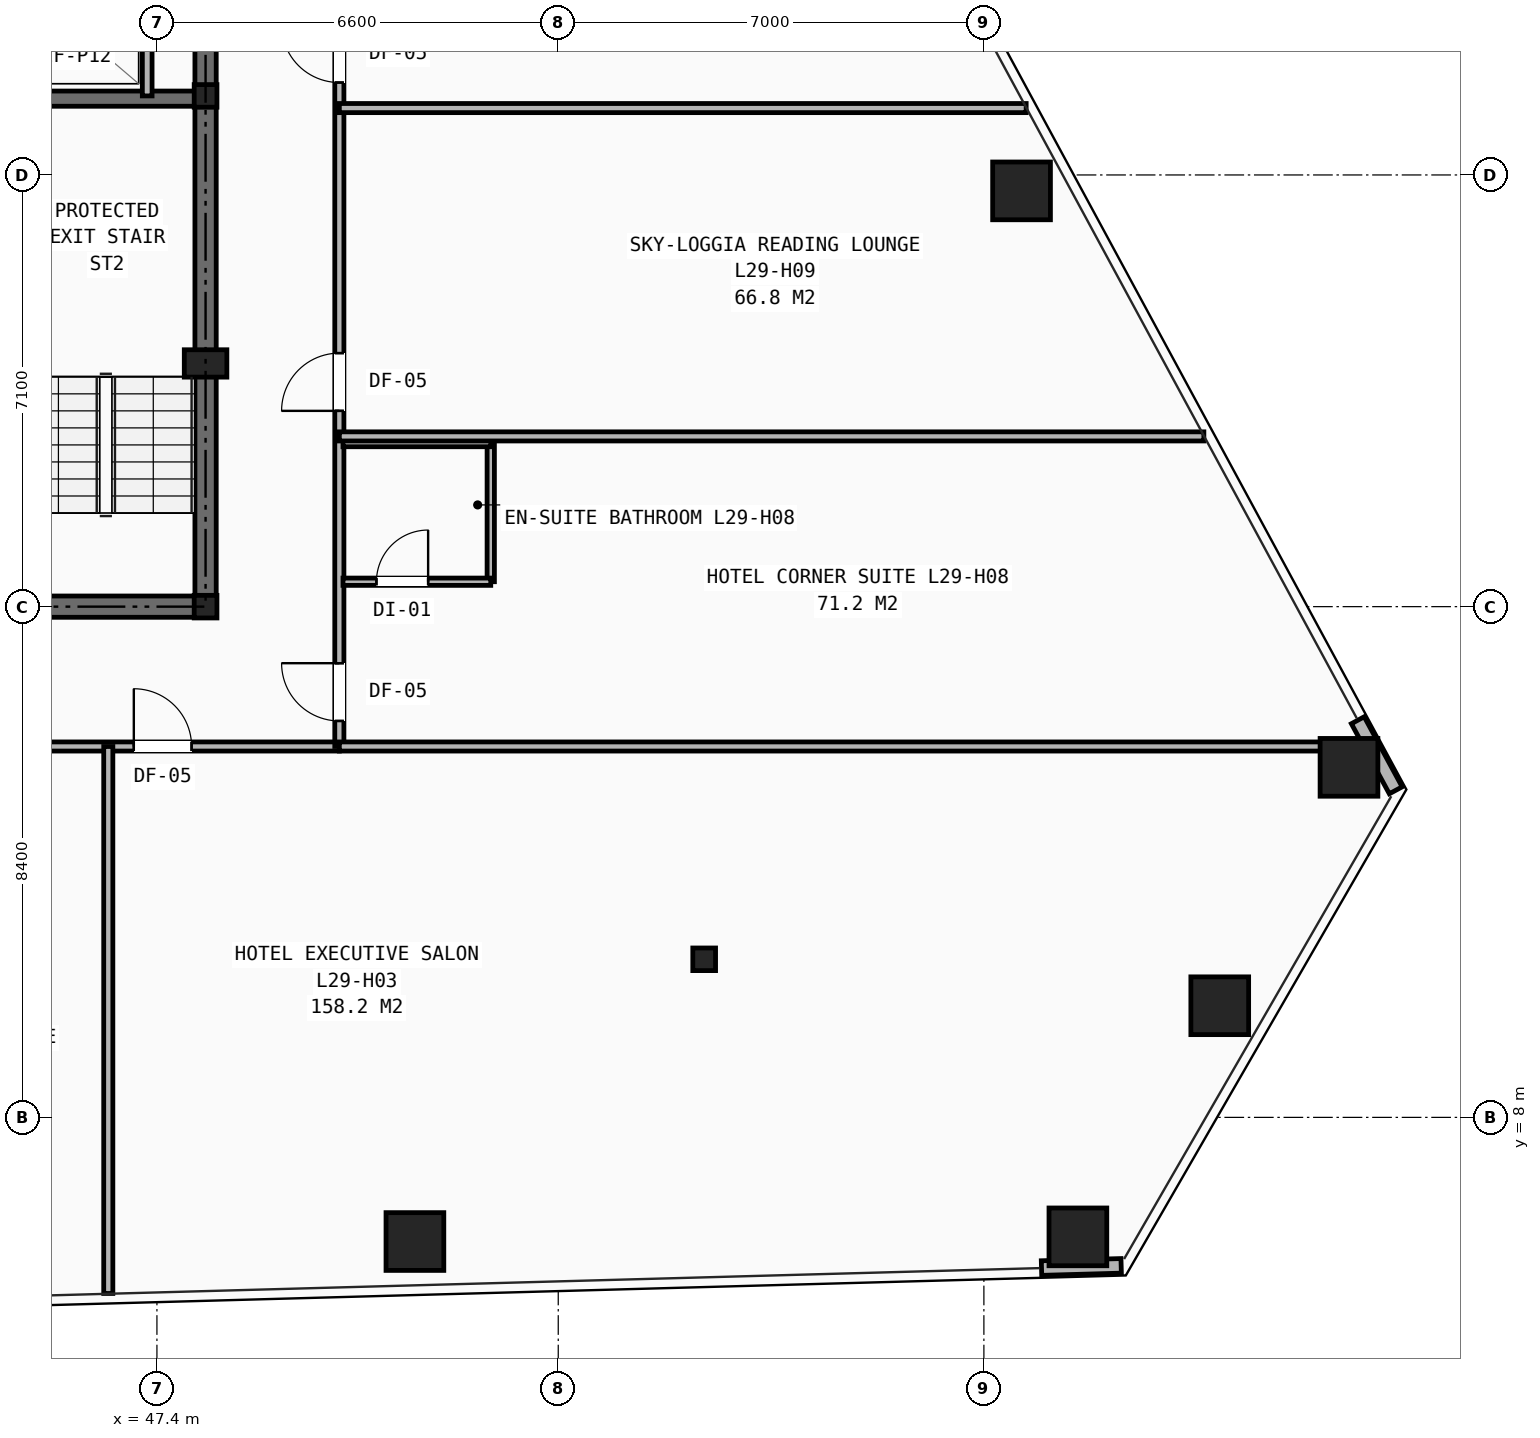
"""IFC4 building model, lengths in metres.
Left out: names, types, materials, properties, quantities, classifications, styles, units other than length and angle.
Written with IfcOpenShell. Run it as: python <this file> out.ifc"""

import sys

from ifc_helpers import new_model, si_unit, direction, frame, frame_2d, origin, origin_2d, place, context, subcontext, project, spatial, rectangle, hollow_rectangle, i_section, extrude, element, fill, save


model = new_model("IFC4")
c1 = context("Model", 3, precision=1e-05, world=origin(), true_north=direction((0.0, 1.0)))
c2 = subcontext(c1, "Body", "Model", "MODEL_VIEW")
j1 = project(units=[si_unit("LENGTHUNIT", "METRE"), si_unit("PLANEANGLEUNIT", "RADIAN")], contexts=[c1])
p1 = place(None, origin())
s1 = spatial("IfcSite", under=j1, at=p1, CompositionType="ELEMENT")
p2 = place(p1, origin())
s2 = spatial("IfcBuilding", under=s1, at=p2, CompositionType="ELEMENT")
p3 = place(p2, frame((0.0, 0.0, 102.2)))
s3 = spatial("IfcBuildingStorey", under=s2, at=p3, CompositionType="ELEMENT", Elevation=102.2)
for number, where, z_axis, x_axis in (
    (1, (48.2, 16.4, 0.0), (0.0, 0.0, 1.0), (1.0, 0.0, 0.0)),
    (2, (48.2, 24.8, 0.0), (0.0, 0.0, 1.0), (1.0, 0.0, 0.0)),
    (3, (56.4, 10.6, 0.0), (0.0, 0.0, 1.0), (1.0, 0.0, 0.0)),
):
    element("IfcColumn", number, at=place(p3, frame(where, z_axis=z_axis, x_axis=x_axis)), inside=s3, PredefinedType="COLUMN", context=c2, shape_type="SweptSolid", body=[
        extrude(i_section(OverallWidth=0.374, OverallDepth=0.372, WebThickness=0.016, FlangeThickness=0.026, at=origin_2d()), origin(), (0.0, 0.0, 1.0), 3.2),
    ])
p4 = place(p3, frame((48.2, 20.4, 0.0), z_axis=(0.0, 0.0, 1.0), x_axis=(1.0, 0.0, 0.0)))
e4 = element("IfcColumn", 4, at=p4, inside=s3, PredefinedType="PILASTER", context=c2, shape_type="SweptSolid", body=[
    extrude(rectangle(XDim=0.7, YDim=0.45, at=origin_2d()), origin(), (0.0, 0.0, 1.0), 3.2),
])
for number, where, z_axis, x_axis in (
    (5, (51.643, 5.958, 0.0), (0.0, 0.0, 1.0), (1.0, 0.0, 0.0)),
    (6, (62.546, 6.035, 0.0), (0.0, 0.0, 1.0), (1.0, 0.0, 0.0)),
    (7, (64.879, 9.836, 0.0), (0.0, 0.0, 1.0), (1.0, 0.0, 0.0)),
    (8, (67.004, 13.757, 0.0), (0.0, 0.0, 1.0), (1.0, 0.0, 0.0)),
    (9, (61.619, 23.238, 0.0), (0.0, 0.0, 1.0), (1.0, 0.0, 0.0)),
):
    element("IfcColumn", number, at=place(p3, frame(where, z_axis=z_axis, x_axis=x_axis)), inside=s3, PredefinedType="COLUMN", context=c2, shape_type="SweptSolid", body=[
        extrude(hollow_rectangle(XDim=0.95, YDim=0.95, WallThickness=0.065, at=origin_2d()), origin(), (0.0, 0.0, 1.0), 3.2),
    ])
p5 = place(p3, frame((61.948, 5.522, 0.0), z_axis=(0.0, 0.0, 1.0), x_axis=(0.999614564295, 0.027761895635, 0.0)))
e10 = element("IfcWall", 10, at=p5, inside=s3, PredefinedType="SHEAR", context=c2, shape_type="SweptSolid", body=[
    extrude(rectangle(XDim=1.31, YDim=0.24, at=frame_2d((0.655, 0.0))), origin(), (0.0, 0.0, 1.0), 2.253),
])
p6 = place(p3, frame((67.773, 13.379, 0.0), z_axis=(0.0, 0.0, 1.0), x_axis=(-0.475820948293, 0.879542167929, 0.0)))
e11 = element("IfcWall", 11, at=p6, inside=s3, PredefinedType="SHEAR", context=c2, shape_type="SweptSolid", body=[
    extrude(rectangle(XDim=1.311, YDim=0.24, at=frame_2d((0.655, 0.0))), origin(), (0.0, 0.0, 1.0), 2.253),
])
p7 = place(p3, frame((31.8, 16.4, 0.0), z_axis=(0.0, 0.0, 1.0), x_axis=(1.0, 0.0, 0.0)))
e12 = element("IfcWall", 12, at=p7, inside=s3, PredefinedType="SHEAR", context=c2, shape_type="SweptSolid", body=[
    extrude(rectangle(XDim=16.4, YDim=0.35, at=frame_2d((8.2, 0.0))), origin(), (0.0, 0.0, 1.0), 2.97),
])
p8 = place(p7, frame((7.75, 0.0, 0.0)))
e13 = element("IfcOpeningElement", 13, at=p8, cuts=e12, PredefinedType="OPENING", context=c2, shape_type="SweptSolid", body=[
    extrude(rectangle(XDim=0.9, YDim=2.1, at=frame_2d((0.45, 1.05))), frame((0.0, 0.185, 0.0), z_axis=(0.0, -1.0, 0.0), x_axis=(1.0, 0.0, 0.0)), (0.0, 0.0, 1.0), 0.37),
])
p9 = place(p7, frame((4.2, 0.0, 0.0)))
e14 = element("IfcOpeningElement", 14, at=p9, cuts=e12, PredefinedType="OPENING", context=c2, shape_type="SweptSolid", body=[
    extrude(rectangle(XDim=0.95, YDim=2.1, at=frame_2d((0.475, 1.05))), frame((0.0, 0.185, 0.0), z_axis=(0.0, -1.0, 0.0), x_axis=(1.0, 0.0, 0.0)), (0.0, 0.0, 1.0), 0.37),
])
p10 = place(p7, frame((10.6, 0.0, 0.0)))
e15 = element("IfcOpeningElement", 15, at=p10, cuts=e12, PredefinedType="OPENING", context=c2, shape_type="SweptSolid", body=[
    extrude(rectangle(XDim=0.95, YDim=2.1, at=frame_2d((0.475, 1.05))), frame((0.0, 0.185, 0.0), z_axis=(0.0, -1.0, 0.0), x_axis=(1.0, 0.0, 0.0)), (0.0, 0.0, 1.0), 0.37),
])
p11 = place(p3, frame((48.2, 16.4, 0.0), z_axis=(0.0, 0.0, 1.0), x_axis=(0.0, 1.0, 0.0)))
e16 = element("IfcWall", 16, at=p11, inside=s3, PredefinedType="SHEAR", context=c2, shape_type="SweptSolid", body=[
    extrude(rectangle(XDim=14.8, YDim=0.35, at=frame_2d((7.4, 0.0))), origin(), (0.0, 0.0, 1.0), 2.97),
])
p12 = place(p11, frame((11.0, 0.0, 0.0)))
e17 = element("IfcOpeningElement", 17, at=p12, cuts=e16, PredefinedType="OPENING", context=c2, shape_type="SweptSolid", body=[
    extrude(rectangle(XDim=1.1, YDim=2.15, at=frame_2d((0.55, 1.075))), frame((0.0, 0.185, 0.0), z_axis=(0.0, -1.0, 0.0), x_axis=(1.0, 0.0, 0.0)), (0.0, 0.0, 1.0), 0.37),
])
p13 = place(p3, frame((44.955, 24.755, 0.0), z_axis=(0.0, 0.0, 1.0), x_axis=(1.0, 0.0, 0.0)))
e18 = element("IfcWall", 18, at=p13, inside=s3, PredefinedType="SHEAR", context=c2, shape_type="SweptSolid", body=[
    extrude(rectangle(XDim=3.245, YDim=0.25, at=frame_2d((1.623, 0.0))), origin(), (0.0, 0.0, 1.0), 2.97),
])
p14 = place(p3, frame((47.24, 24.8, 0.0), z_axis=(0.0, 0.0, 1.0), x_axis=(0.0, 1.0, 0.0)))
e19 = element("IfcWall", 19, at=p14, inside=s3, PredefinedType="SOLIDWALL", context=c2, shape_type="SweptSolid", body=[
    extrude(rectangle(XDim=2.08, YDim=0.16, at=frame_2d((1.04, 0.0))), origin(), (0.0, 0.0, 1.0), 2.97),
])
p15 = place(p3, frame((29.6, 14.1, 0.0), z_axis=(0.0, 0.0, 1.0), x_axis=(1.0, 0.0, 0.0)))
e20 = element("IfcWall", 20, at=p15, inside=s3, PredefinedType="PARTITIONING", context=c2, shape_type="SweptSolid", body=[
    extrude(rectangle(XDim=20.8, YDim=0.15, at=frame_2d((10.4, 0.0))), origin(), (0.0, 0.0, 1.0), 2.421),
])
p16 = place(p15, frame((0.57, 0.0, 0.0)))
e21 = element("IfcOpeningElement", 21, at=p16, cuts=e20, PredefinedType="OPENING", context=c2, shape_type="SweptSolid", body=[
    extrude(rectangle(XDim=0.95, YDim=2.1, at=frame_2d((0.475, 1.05))), frame((0.0, 0.085, 0.0), z_axis=(0.0, -1.0, 0.0), x_axis=(1.0, 0.0, 0.0)), (0.0, 0.0, 1.0), 0.17),
])
p17 = place(p15, frame((13.02, 0.0, 0.0)))
e22 = element("IfcOpeningElement", 22, at=p17, cuts=e20, PredefinedType="OPENING", context=c2, shape_type="SweptSolid", body=[
    extrude(rectangle(XDim=0.95, YDim=2.1, at=frame_2d((0.475, 1.05))), frame((0.0, 0.085, 0.0), z_axis=(0.0, -1.0, 0.0), x_axis=(1.0, 0.0, 0.0)), (0.0, 0.0, 1.0), 0.17),
])
p18 = place(p15, frame((17.42, 0.0, 0.0)))
e23 = element("IfcOpeningElement", 23, at=p18, cuts=e20, PredefinedType="OPENING", context=c2, shape_type="SweptSolid", body=[
    extrude(rectangle(XDim=0.95, YDim=2.1, at=frame_2d((0.475, 1.05))), frame((0.0, 0.085, 0.0), z_axis=(0.0, -1.0, 0.0), x_axis=(1.0, 0.0, 0.0)), (0.0, 0.0, 1.0), 0.17),
])
p19 = place(p3, frame((50.4, 14.1, 0.0), z_axis=(0.0, 0.0, 1.0), x_axis=(0.0, 1.0, 0.0)))
e24 = element("IfcWall", 24, at=p19, inside=s3, PredefinedType="PARTITIONING", context=c2, shape_type="SweptSolid", body=[
    extrude(rectangle(XDim=21.9, YDim=0.15, at=frame_2d((10.95, 0.0))), origin(), (0.0, 0.0, 1.0), 2.421),
])
p20 = place(p19, frame((0.42, 0.0, 0.0)))
e25 = element("IfcOpeningElement", 25, at=p20, cuts=e24, PredefinedType="OPENING", context=c2, shape_type="SweptSolid", body=[
    extrude(rectangle(XDim=0.95, YDim=2.1, at=frame_2d((0.475, 1.05))), frame((0.0, 0.085, 0.0), z_axis=(0.0, -1.0, 0.0), x_axis=(1.0, 0.0, 0.0)), (0.0, 0.0, 1.0), 0.17),
])
p21 = place(p19, frame((5.52, 0.0, 0.0)))
e26 = element("IfcOpeningElement", 26, at=p21, cuts=e24, PredefinedType="OPENING", context=c2, shape_type="SweptSolid", body=[
    extrude(rectangle(XDim=0.95, YDim=2.1, at=frame_2d((0.475, 1.05))), frame((0.0, 0.085, 0.0), z_axis=(0.0, -1.0, 0.0), x_axis=(1.0, 0.0, 0.0)), (0.0, 0.0, 1.0), 0.17),
])
p22 = place(p19, frame((10.92, 0.0, 0.0)))
e27 = element("IfcOpeningElement", 27, at=p22, cuts=e24, PredefinedType="OPENING", context=c2, shape_type="SweptSolid", body=[
    extrude(rectangle(XDim=0.95, YDim=2.1, at=frame_2d((0.475, 1.05))), frame((0.0, 0.085, 0.0), z_axis=(0.0, -1.0, 0.0), x_axis=(1.0, 0.0, 0.0)), (0.0, 0.0, 1.0), 0.17),
])
p23 = place(p19, frame((16.72, 0.0, 0.0)))
e28 = element("IfcOpeningElement", 28, at=p23, cuts=e24, PredefinedType="OPENING", context=c2, shape_type="SweptSolid", body=[
    extrude(rectangle(XDim=0.95, YDim=2.1, at=frame_2d((0.475, 1.05))), frame((0.0, 0.085, 0.0), z_axis=(0.0, -1.0, 0.0), x_axis=(1.0, 0.0, 0.0)), (0.0, 0.0, 1.0), 0.17),
])
p24 = place(p3, frame((46.6, 5.104, 0.0), z_axis=(0.0, 0.0, 1.0), x_axis=(0.0, 1.0, 0.0)))
e29 = element("IfcWall", 29, at=p24, inside=s3, PredefinedType="PARTITIONING", context=c2, shape_type="SweptSolid", body=[
    extrude(rectangle(XDim=8.996, YDim=0.15, at=frame_2d((4.498, 0.0))), origin(), (0.0, 0.0, 1.0), 2.258),
])
p25 = place(p3, frame((50.4, 14.1, 0.0), z_axis=(0.0, 0.0, 1.0), x_axis=(1.0, 0.0, 0.0)))
e30 = element("IfcWall", 30, at=p25, inside=s3, PredefinedType="PARTITIONING", context=c2, shape_type="SweptSolid", body=[
    extrude(rectangle(XDim=16.978, YDim=0.15, at=frame_2d((8.489, 0.0))), origin(), (0.0, 0.0, 1.0), 2.258),
])
p26 = place(p3, frame((52.89, 16.81, 0.0), z_axis=(0.0, 0.0, 1.0), x_axis=(0.0, 1.0, 0.0)))
e31 = element("IfcWall", 31, at=p26, inside=s3, PredefinedType="PARTITIONING", context=c2, shape_type="SweptSolid", body=[
    extrude(rectangle(XDim=2.28, YDim=0.12, at=frame_2d((1.14, 0.0))), origin(), (0.0, 0.0, 1.0), 2.97),
])
p27 = place(p3, frame((50.46, 16.81, 0.0), z_axis=(0.0, 0.0, 1.0), x_axis=(1.0, 0.0, 0.0)))
e32 = element("IfcWall", 32, at=p27, inside=s3, PredefinedType="PARTITIONING", context=c2, shape_type="SweptSolid", body=[
    extrude(rectangle(XDim=2.43, YDim=0.12, at=frame_2d((1.215, 0.0))), origin(), (0.0, 0.0, 1.0), 2.97),
])
p28 = place(p27, frame((0.55, 0.0, 0.0)))
e33 = element("IfcOpeningElement", 33, at=p28, cuts=e32, PredefinedType="OPENING", context=c2, shape_type="SweptSolid", body=[
    extrude(rectangle(XDim=0.85, YDim=2.05, at=frame_2d((0.425, 1.025))), frame((0.0, 0.07, 0.0), z_axis=(0.0, -1.0, 0.0), x_axis=(1.0, 0.0, 0.0)), (0.0, 0.0, 1.0), 0.14),
])
p29 = place(p3, frame((50.46, 19.09, 0.0), z_axis=(0.0, 0.0, 1.0), x_axis=(1.0, 0.0, 0.0)))
e34 = element("IfcWall", 34, at=p29, inside=s3, PredefinedType="PARTITIONING", context=c2, shape_type="SweptSolid", body=[
    extrude(rectangle(XDim=2.43, YDim=0.12, at=frame_2d((1.215, 0.0))), origin(), (0.0, 0.0, 1.0), 2.97),
])
p30 = place(p3, frame((50.4, 19.2, 0.0), z_axis=(0.0, 0.0, 1.0), x_axis=(1.0, 0.0, 0.0)))
e35 = element("IfcWall", 35, at=p30, inside=s3, PredefinedType="PARTITIONING", context=c2, shape_type="SweptSolid", body=[
    extrude(rectangle(XDim=14.218, YDim=0.15, at=frame_2d((7.109, 0.0))), origin(), (0.0, 0.0, 1.0), 2.258),
])
p31 = place(p3, frame((50.4, 24.6, 0.0), z_axis=(0.0, 0.0, 1.0), x_axis=(1.0, 0.0, 0.0)))
e36 = element("IfcWall", 36, at=p31, inside=s3, PredefinedType="PARTITIONING", context=c2, shape_type="SweptSolid", body=[
    extrude(rectangle(XDim=11.295, YDim=0.15, at=frame_2d((5.648, 0.0))), origin(), (0.0, 0.0, 1.0), 2.258),
])
p32 = place(p18, origin())
e37 = element("IfcDoor", 37, at=p32, inside=s3, OperationType="SINGLE_SWING_LEFT", PredefinedType="DOOR", context=c2, shape_type="SweptSolid", body=[
    extrude(rectangle(XDim=0.95, YDim=2.1, at=frame_2d((0.475, 1.05))), frame((0.0, 0.025, 0.0), z_axis=(0.0, -1.0, 0.0), x_axis=(1.0, 0.0, 0.0)), (0.0, 0.0, 1.0), 0.05),
])
fill(e23, e37)
p33 = place(p20, origin())
e38 = element("IfcDoor", 38, at=p33, inside=s3, OperationType="SINGLE_SWING_RIGHT", PredefinedType="DOOR", context=c2, shape_type="SweptSolid", body=[
    extrude(rectangle(XDim=0.95, YDim=2.1, at=frame_2d((0.475, 1.05))), frame((0.0, 0.025, 0.0), z_axis=(0.0, -1.0, 0.0), x_axis=(1.0, 0.0, 0.0)), (0.0, 0.0, 1.0), 0.05),
])
fill(e25, e38)
p34 = place(p28, origin())
e39 = element("IfcDoor", 39, at=p34, inside=s3, OperationType="SINGLE_SWING_RIGHT", PredefinedType="DOOR", context=c2, shape_type="SweptSolid", body=[
    extrude(rectangle(XDim=0.85, YDim=2.05, at=frame_2d((0.425, 1.025))), frame((0.0, 0.025, 0.0), z_axis=(0.0, -1.0, 0.0), x_axis=(1.0, 0.0, 0.0)), (0.0, 0.0, 1.0), 0.05),
])
fill(e33, e39)
p35 = place(p21, origin())
e40 = element("IfcDoor", 40, at=p35, inside=s3, OperationType="SINGLE_SWING_LEFT", PredefinedType="DOOR", context=c2, shape_type="SweptSolid", body=[
    extrude(rectangle(XDim=0.95, YDim=2.1, at=frame_2d((0.475, 1.05))), frame((0.0, 0.025, 0.0), z_axis=(0.0, -1.0, 0.0), x_axis=(1.0, 0.0, 0.0)), (0.0, 0.0, 1.0), 0.05),
])
fill(e26, e40)
p36 = place(p22, origin())
e41 = element("IfcDoor", 41, at=p36, inside=s3, OperationType="SINGLE_SWING_RIGHT", PredefinedType="DOOR", context=c2, shape_type="SweptSolid", body=[
    extrude(rectangle(XDim=0.95, YDim=2.1, at=frame_2d((0.475, 1.05))), frame((0.0, 0.025, 0.0), z_axis=(0.0, -1.0, 0.0), x_axis=(1.0, 0.0, 0.0)), (0.0, 0.0, 1.0), 0.05),
])
fill(e27, e41)
save(model, sys.argv[1])
